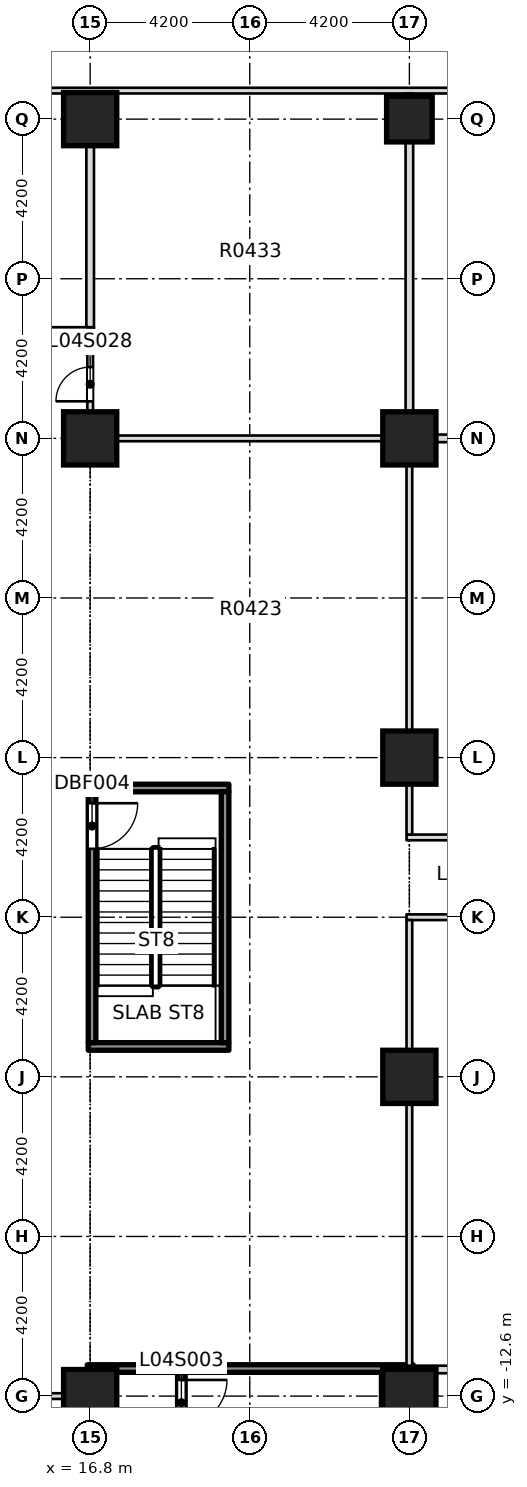
"""IFC4 building model, lengths in metres.
Left out: names, types, materials, properties, quantities, classifications, styles, units other than length and angle.
Written with IfcOpenShell. Run it as: python <this file> out.ifc"""

import sys

from ifc_helpers import new_model, si_unit, direction, frame, frame_2d, origin, origin_2d, place, context, subcontext, project, spatial, rectangle, extrude, element, fill, save


model = new_model("IFC4")
c1 = context("Model", 3, precision=1e-05, world=origin(), true_north=direction((0.0, 1.0)))
c2 = subcontext(c1, "Body", "Model", "MODEL_VIEW")
j1 = project(units=[si_unit("LENGTHUNIT", "METRE"), si_unit("PLANEANGLEUNIT", "RADIAN")], contexts=[c1])
p1 = place(None, origin())
s1 = spatial("IfcSite", under=j1, at=p1, CompositionType="ELEMENT")
p2 = place(p1, origin())
s2 = spatial("IfcBuilding", under=s1, at=p2, CompositionType="ELEMENT")
p3 = place(p2, frame((0.0, 0.0, 25.0)))
s3 = spatial("IfcBuildingStorey", under=s2, at=p3, CompositionType="ELEMENT", Elevation=25.0)
for number, where, z_axis, x_axis in (
    (1, (16.8, -12.6, -0.4), (0.0, 0.0, 1.0), (1.0, 0.0, 0.0)),
    (2, (25.2, -12.6, -0.4), (0.0, 0.0, 1.0), (1.0, 0.0, 0.0)),
    (3, (25.2, -4.2, -0.4), (0.0, 0.0, 1.0), (1.0, 0.0, 0.0)),
    (4, (25.2, 4.2, -0.4), (0.0, 0.0, 1.0), (1.0, 0.0, 0.0)),
    (5, (16.8, 12.6, -0.4), (0.0, 0.0, 1.0), (1.0, 0.0, 0.0)),
    (6, (25.2, 12.6, -0.4), (0.0, 0.0, 1.0), (1.0, 0.0, 0.0)),
    (7, (16.8, 21.0, -0.4), (0.0, 0.0, 1.0), (1.0, 0.0, 0.0)),
):
    element("IfcColumn", number, at=place(p3, frame(where, z_axis=z_axis, x_axis=x_axis)), inside=s3, PredefinedType="COLUMN", context=c2, shape_type="SweptSolid", body=[
        extrude(rectangle(XDim=1.4, YDim=1.4, at=origin_2d()), origin(), (0.0, 0.0, 1.0), 5.0),
    ])
p4 = place(p3, frame((25.2, 21.0, 0.0), z_axis=(0.0, 0.0, 1.0), x_axis=(1.0, 0.0, 0.0)))
e8 = element("IfcColumn", 8, at=p4, inside=s3, PredefinedType="COLUMN", context=c2, shape_type="SweptSolid", body=[
    extrude(rectangle(XDim=1.2, YDim=1.2, at=origin_2d()), origin(), (0.0, 0.0, 1.0), 5.0),
])
p5 = place(p3, frame((7.275, -12.6, 0.0), z_axis=(0.0, 0.0, 1.0), x_axis=(1.0, 0.0, 0.0)))
e9 = element("IfcWall", 9, at=p5, inside=s3, PredefinedType="PARTITIONING", context=c2, shape_type="SweptSolid", body=[
    extrude(rectangle(XDim=9.625, YDim=0.15, at=frame_2d((4.812, 0.0))), origin(), (0.0, 0.0, 1.0), 4.6),
])
p6 = place(p3, frame((16.725, -11.875, 0.0), z_axis=(0.0, 0.0, 1.0), x_axis=(1.0, 0.0, 0.0)))
e10 = element("IfcWall", 10, at=p6, inside=s3, PredefinedType="SOLIDWALL", context=c2, shape_type="SweptSolid", body=[
    extrude(rectangle(XDim=8.575, YDim=0.2, at=frame_2d((4.288, 0.0))), origin(), (0.0, 0.0, 1.0), 4.6),
])
p7 = place(p3, frame((25.1, -11.9, 0.0), z_axis=(0.0, 0.0, 1.0), x_axis=(1.0, 0.0, 0.0)))
e11 = element("IfcWall", 11, at=p7, inside=s3, PredefinedType="PARTITIONING", context=c2, shape_type="SweptSolid", body=[
    extrude(rectangle(XDim=11.15, YDim=0.2, at=frame_2d((5.575, 0.0))), origin(), (0.0, 0.0, 1.0), 4.6),
])
p8 = place(p3, frame((25.125, 0.0, 0.0), z_axis=(0.0, 0.0, 1.0), x_axis=(1.0, 0.0, 0.0)))
e12 = element("IfcWall", 12, at=p8, inside=s3, PredefinedType="PARTITIONING", context=c2, shape_type="SweptSolid", body=[
    extrude(rectangle(XDim=11.1, YDim=0.15, at=frame_2d((5.55, 0.0))), origin(), (0.0, 0.0, 1.0), 4.6),
])
p9 = place(p8, frame((1.45, 0.0, 0.0)))
e13 = element("IfcOpeningElement", 13, at=p9, cuts=e12, PredefinedType="OPENING", context=c2, shape_type="SweptSolid", body=[
    extrude(rectangle(XDim=0.9, YDim=2.1, at=frame_2d((0.45, 1.05))), frame((0.0, 0.085, 0.0), z_axis=(0.0, -1.0, 0.0), x_axis=(1.0, 0.0, 0.0)), (0.0, 0.0, 1.0), 0.17),
])
p10 = place(p8, frame((5.1, 0.0, 0.0)))
e14 = element("IfcOpeningElement", 14, at=p10, cuts=e12, PredefinedType="OPENING", context=c2, shape_type="SweptSolid", body=[
    extrude(rectangle(XDim=0.9, YDim=2.1, at=frame_2d((0.45, 1.05))), frame((0.0, 0.085, 0.0), z_axis=(0.0, -1.0, 0.0), x_axis=(1.0, 0.0, 0.0)), (0.0, 0.0, 1.0), 0.17),
])
p11 = place(p8, frame((8.75, 0.0, 0.0)))
e15 = element("IfcOpeningElement", 15, at=p11, cuts=e12, PredefinedType="OPENING", context=c2, shape_type="SweptSolid", body=[
    extrude(rectangle(XDim=0.9, YDim=2.1, at=frame_2d((0.45, 1.05))), frame((0.0, 0.085, 0.0), z_axis=(0.0, -1.0, 0.0), x_axis=(1.0, 0.0, 0.0)), (0.0, 0.0, 1.0), 0.17),
])
p12 = place(p3, frame((25.125, 2.1, 0.0), z_axis=(0.0, 0.0, 1.0), x_axis=(1.0, 0.0, 0.0)))
e16 = element("IfcWall", 16, at=p12, inside=s3, PredefinedType="PARTITIONING", context=c2, shape_type="SweptSolid", body=[
    extrude(rectangle(XDim=17.425, YDim=0.15, at=frame_2d((8.712, 0.0))), origin(), (0.0, 0.0, 1.0), 4.6),
])
p13 = place(p12, frame((1.725, 0.0, 0.0)))
e17 = element("IfcOpeningElement", 17, at=p13, cuts=e16, PredefinedType="OPENING", context=c2, shape_type="SweptSolid", body=[
    extrude(rectangle(XDim=0.9, YDim=2.1, at=frame_2d((0.45, 1.05))), frame((0.0, 0.085, 0.0), z_axis=(0.0, -1.0, 0.0), x_axis=(1.0, 0.0, 0.0)), (0.0, 0.0, 1.0), 0.17),
])
p14 = place(p12, frame((5.925, 0.0, 0.0)))
e18 = element("IfcOpeningElement", 18, at=p14, cuts=e16, PredefinedType="OPENING", context=c2, shape_type="SweptSolid", body=[
    extrude(rectangle(XDim=0.9, YDim=2.1, at=frame_2d((0.45, 1.05))), frame((0.0, 0.085, 0.0), z_axis=(0.0, -1.0, 0.0), x_axis=(1.0, 0.0, 0.0)), (0.0, 0.0, 1.0), 0.17),
])
p15 = place(p12, frame((12.5, 0.0, 0.0)))
e19 = element("IfcOpeningElement", 19, at=p15, cuts=e16, PredefinedType="OPENING", context=c2, shape_type="SweptSolid", body=[
    extrude(rectangle(XDim=0.9, YDim=2.1, at=frame_2d((0.45, 1.05))), frame((0.0, 0.085, 0.0), z_axis=(0.0, -1.0, 0.0), x_axis=(1.0, 0.0, 0.0)), (0.0, 0.0, 1.0), 0.17),
])
p16 = place(p3, frame((16.725, 12.6, 0.0), z_axis=(0.0, 0.0, 1.0), x_axis=(1.0, 0.0, 0.0)))
e20 = element("IfcWall", 20, at=p16, inside=s3, PredefinedType="PARTITIONING", context=c2, shape_type="SweptSolid", body=[
    extrude(rectangle(XDim=8.575, YDim=0.15, at=frame_2d((4.288, 0.0))), origin(), (0.0, 0.0, 1.0), 4.6),
])
p17 = place(p3, frame((25.1, 12.6, 0.0), z_axis=(0.0, 0.0, 1.0), x_axis=(1.0, 0.0, 0.0)))
e21 = element("IfcWall", 21, at=p17, inside=s3, PredefinedType="PARTITIONING", context=c2, shape_type="SweptSolid", body=[
    extrude(rectangle(XDim=17.45, YDim=0.2, at=frame_2d((8.725, 0.0))), origin(), (0.0, 0.0, 1.0), 4.6),
])
p18 = place(p3, frame((12.601, 15.45, 0.0), z_axis=(0.0, 0.0, 1.0), x_axis=(1.0, 0.0, 0.0)))
e22 = element("IfcWall", 22, at=p18, inside=s3, PredefinedType="PARTITIONING", context=c2, shape_type="SweptSolid", body=[
    extrude(rectangle(XDim=4.299, YDim=0.15, at=frame_2d((2.149, 0.0))), origin(), (0.0, 0.0, 1.0), 4.6),
])
p19 = place(p18, frame((1.549, 0.0, 0.0)))
e23 = element("IfcOpeningElement", 23, at=p19, cuts=e22, PredefinedType="OPENING", context=c2, shape_type="SweptSolid", body=[
    extrude(rectangle(XDim=1.1, YDim=2.1, at=frame_2d((0.55, 1.05))), frame((0.0, 0.085, 0.0), z_axis=(0.0, -1.0, 0.0), x_axis=(1.0, 0.0, 0.0)), (0.0, 0.0, 1.0), 0.17),
])
p20 = place(p3, frame((12.601, 21.75, 0.0), z_axis=(0.0, 0.0, 1.0), x_axis=(1.0, 0.0, 0.0)))
e24 = element("IfcWall", 24, at=p20, inside=s3, PredefinedType="PARTITIONING", context=c2, shape_type="SweptSolid", body=[
    extrude(rectangle(XDim=21.074, YDim=0.15, at=frame_2d((10.537, 0.0))), origin(), (0.0, 0.0, 1.0), 4.6),
])
p21 = place(p20, frame((16.349, 0.0, 0.0)))
e25 = element("IfcOpeningElement", 25, at=p21, cuts=e24, PredefinedType="OPENING", context=c2, shape_type="SweptSolid", body=[
    extrude(rectangle(XDim=0.9, YDim=2.1, at=frame_2d((0.45, 1.05))), frame((0.0, 0.085, 0.0), z_axis=(0.0, -1.0, 0.0), x_axis=(1.0, 0.0, 0.0)), (0.0, 0.0, 1.0), 0.17),
])
p22 = place(p3, frame((16.8, -18.125, 0.0), z_axis=(0.0, 0.0, 1.0), x_axis=(0.0, 1.0, 0.0)))
e26 = element("IfcWall", 26, at=p22, inside=s3, PredefinedType="PARTITIONING", context=c2, shape_type="SweptSolid", body=[
    extrude(rectangle(XDim=5.45, YDim=0.2, at=frame_2d((2.725, 0.0))), origin(), (0.0, 0.0, 1.0), 4.6),
])
p23 = place(p3, frame((16.8, -12.525, 0.0), z_axis=(0.0, 0.0, 1.0), x_axis=(0.0, 1.0, 0.0)))
e27 = element("IfcWall", 27, at=p23, inside=s3, PredefinedType="PARTITIONING", context=c2, shape_type="SweptSolid", body=[
    extrude(rectangle(XDim=0.55, YDim=0.15, at=frame_2d((0.275, 0.0))), origin(), (0.0, 0.0, 1.0), 4.6),
])
p24 = place(p3, frame((16.8, 12.675, 0.0), z_axis=(0.0, 0.0, 1.0), x_axis=(0.0, 1.0, 0.0)))
e28 = element("IfcWall", 28, at=p24, inside=s3, PredefinedType="PARTITIONING", context=c2, shape_type="SweptSolid", body=[
    extrude(rectangle(XDim=2.7, YDim=0.15, at=frame_2d((1.35, 0.0))), origin(), (0.0, 0.0, 1.0), 4.6),
])
p25 = place(p24, frame((0.9, 0.0, 0.0)))
e29 = element("IfcOpeningElement", 29, at=p25, cuts=e28, PredefinedType="OPENING", context=c2, shape_type="SweptSolid", body=[
    extrude(rectangle(XDim=0.9, YDim=2.1, at=frame_2d((0.45, 1.05))), frame((0.0, 0.085, 0.0), z_axis=(0.0, -1.0, 0.0), x_axis=(1.0, 0.0, 0.0)), (0.0, 0.0, 1.0), 0.17),
])
p26 = place(p3, frame((16.8, 15.525, 0.0), z_axis=(0.0, 0.0, 1.0), x_axis=(0.0, 1.0, 0.0)))
e30 = element("IfcWall", 30, at=p26, inside=s3, PredefinedType="PARTITIONING", context=c2, shape_type="SweptSolid", body=[
    extrude(rectangle(XDim=6.15, YDim=0.2, at=frame_2d((3.075, 0.0))), origin(), (0.0, 0.0, 1.0), 4.6),
])
p27 = place(p3, frame((19.2, -18.125, 0.0), z_axis=(0.0, 0.0, 1.0), x_axis=(0.0, 1.0, 0.0)))
e31 = element("IfcWall", 31, at=p27, inside=s3, PredefinedType="SOLIDWALL", context=c2, shape_type="SweptSolid", body=[
    extrude(rectangle(XDim=6.15, YDim=0.2, at=frame_2d((3.075, 0.0))), origin(), (0.0, 0.0, 1.0), 4.6),
])
p28 = place(p27, frame((4.75, 0.0, 0.0)))
e32 = element("IfcOpeningElement", 32, at=p28, cuts=e31, PredefinedType="OPENING", context=c2, shape_type="SweptSolid", body=[
    extrude(rectangle(XDim=1.2, YDim=2.1, at=frame_2d((0.6, 1.05))), frame((0.0, 0.11, 0.0), z_axis=(0.0, -1.0, 0.0), x_axis=(1.0, 0.0, 0.0)), (0.0, 0.0, 1.0), 0.22),
])
p29 = place(p3, frame((25.2, -18.125, 0.0), z_axis=(0.0, 0.0, 1.0), x_axis=(0.0, 1.0, 0.0)))
e33 = element("IfcWall", 33, at=p29, inside=s3, PredefinedType="SOLIDWALL", context=c2, shape_type="SweptSolid", body=[
    extrude(rectangle(XDim=6.125, YDim=0.2, at=frame_2d((3.062, 0.0))), origin(), (0.0, 0.0, 1.0), 4.6),
])
p30 = place(p3, frame((25.2, -11.8, 0.0), z_axis=(0.0, 0.0, 1.0), x_axis=(0.0, 1.0, 0.0)))
e34 = element("IfcWall", 34, at=p30, inside=s3, PredefinedType="PARTITIONING", context=c2, shape_type="SweptSolid", body=[
    extrude(rectangle(XDim=11.725, YDim=0.15, at=frame_2d((5.863, 0.0))), origin(), (0.0, 0.0, 1.0), 4.6),
])
p31 = place(p3, frame((25.2, 2.175, 0.0), z_axis=(0.0, 0.0, 1.0), x_axis=(0.0, 1.0, 0.0)))
e35 = element("IfcWall", 35, at=p31, inside=s3, PredefinedType="PARTITIONING", context=c2, shape_type="SweptSolid", body=[
    extrude(rectangle(XDim=10.325, YDim=0.15, at=frame_2d((5.163, 0.0))), origin(), (0.0, 0.0, 1.0), 4.6),
])
p32 = place(p3, frame((25.2, 12.7, 0.0), z_axis=(0.0, 0.0, 1.0), x_axis=(0.0, 1.0, 0.0)))
e36 = element("IfcWall", 36, at=p32, inside=s3, PredefinedType="PARTITIONING", context=c2, shape_type="SweptSolid", body=[
    extrude(rectangle(XDim=8.975, YDim=0.2, at=frame_2d((4.488, 0.0))), origin(), (0.0, 0.0, 1.0), 4.6),
])
for number, where, z_axis, x_axis in (
    (37, (16.75, -3.4, 0.0), (0.0, 0.0, 1.0), (1.0, 0.0, 0.0)),
    (38, (16.75, 3.4, 0.0), (0.0, 0.0, 1.0), (1.0, 0.0, 0.0)),
):
    element("IfcWall", number, at=place(p3, frame(where, z_axis=z_axis, x_axis=x_axis)), inside=s3, PredefinedType="SOLIDWALL", context=c2, shape_type="SweptSolid", body=[
        extrude(rectangle(XDim=3.7, YDim=0.2, at=frame_2d((1.85, 0.0))), origin(), (0.0, 0.0, 1.0), 4.6),
    ])
p33 = place(p3, frame((16.85, -3.3, 0.0), z_axis=(0.0, 0.0, 1.0), x_axis=(0.0, 1.0, 0.0)))
e39 = element("IfcWall", 39, at=p33, inside=s3, PredefinedType="SOLIDWALL", context=c2, shape_type="SweptSolid", body=[
    extrude(rectangle(XDim=6.6, YDim=0.2, at=frame_2d((3.3, 0.0))), origin(), (0.0, 0.0, 1.0), 4.6),
])
p34 = place(p33, frame((5.1, 0.0, 0.0)))
e40 = element("IfcOpeningElement", 40, at=p34, cuts=e39, PredefinedType="OPENING", context=c2, shape_type="SweptSolid", body=[
    extrude(rectangle(XDim=1.2, YDim=2.1, at=frame_2d((0.6, 1.05))), frame((0.0, 0.11, 0.0), z_axis=(0.0, -1.0, 0.0), x_axis=(1.0, 0.0, 0.0)), (0.0, 0.0, 1.0), 0.22),
])
p35 = place(p3, frame((20.35, -3.3, 0.0), z_axis=(0.0, 0.0, 1.0), x_axis=(0.0, 1.0, 0.0)))
e41 = element("IfcWall", 41, at=p35, inside=s3, PredefinedType="SOLIDWALL", context=c2, shape_type="SweptSolid", body=[
    extrude(rectangle(XDim=6.6, YDim=0.2, at=frame_2d((3.3, 0.0))), origin(), (0.0, 0.0, 1.0), 4.6),
])
p36 = place(p28, origin())
e42 = element("IfcDoor", 42, at=p36, inside=s3, OperationType="DOUBLE_DOOR_SINGLE_SWING", PredefinedType="DOOR", context=c2, shape_type="SweptSolid", body=[
    extrude(rectangle(XDim=1.2, YDim=2.1, at=frame_2d((0.6, 1.05))), frame((0.0, 0.025, 0.0), z_axis=(0.0, -1.0, 0.0), x_axis=(1.0, 0.0, 0.0)), (0.0, 0.0, 1.0), 0.05),
])
fill(e32, e42)
p37 = place(p25, origin())
e43 = element("IfcDoor", 43, at=p37, inside=s3, OperationType="SINGLE_SWING_RIGHT", PredefinedType="DOOR", context=c2, shape_type="SweptSolid", body=[
    extrude(rectangle(XDim=0.9, YDim=2.1, at=frame_2d((0.45, 1.05))), frame((0.0, 0.025, 0.0), z_axis=(0.0, -1.0, 0.0), x_axis=(1.0, 0.0, 0.0)), (0.0, 0.0, 1.0), 0.05),
])
fill(e29, e43)
p38 = place(p34, origin())
e44 = element("IfcDoor", 44, at=p38, inside=s3, OperationType="SINGLE_SWING_LEFT", PredefinedType="DOOR", context=c2, shape_type="SweptSolid", body=[
    extrude(rectangle(XDim=1.2, YDim=2.1, at=frame_2d((0.6, 1.05))), frame((0.0, 0.025, 0.0), z_axis=(0.0, -1.0, 0.0), x_axis=(1.0, 0.0, 0.0)), (0.0, 0.0, 1.0), 0.05),
])
fill(e40, e44)
save(model, sys.argv[1])
